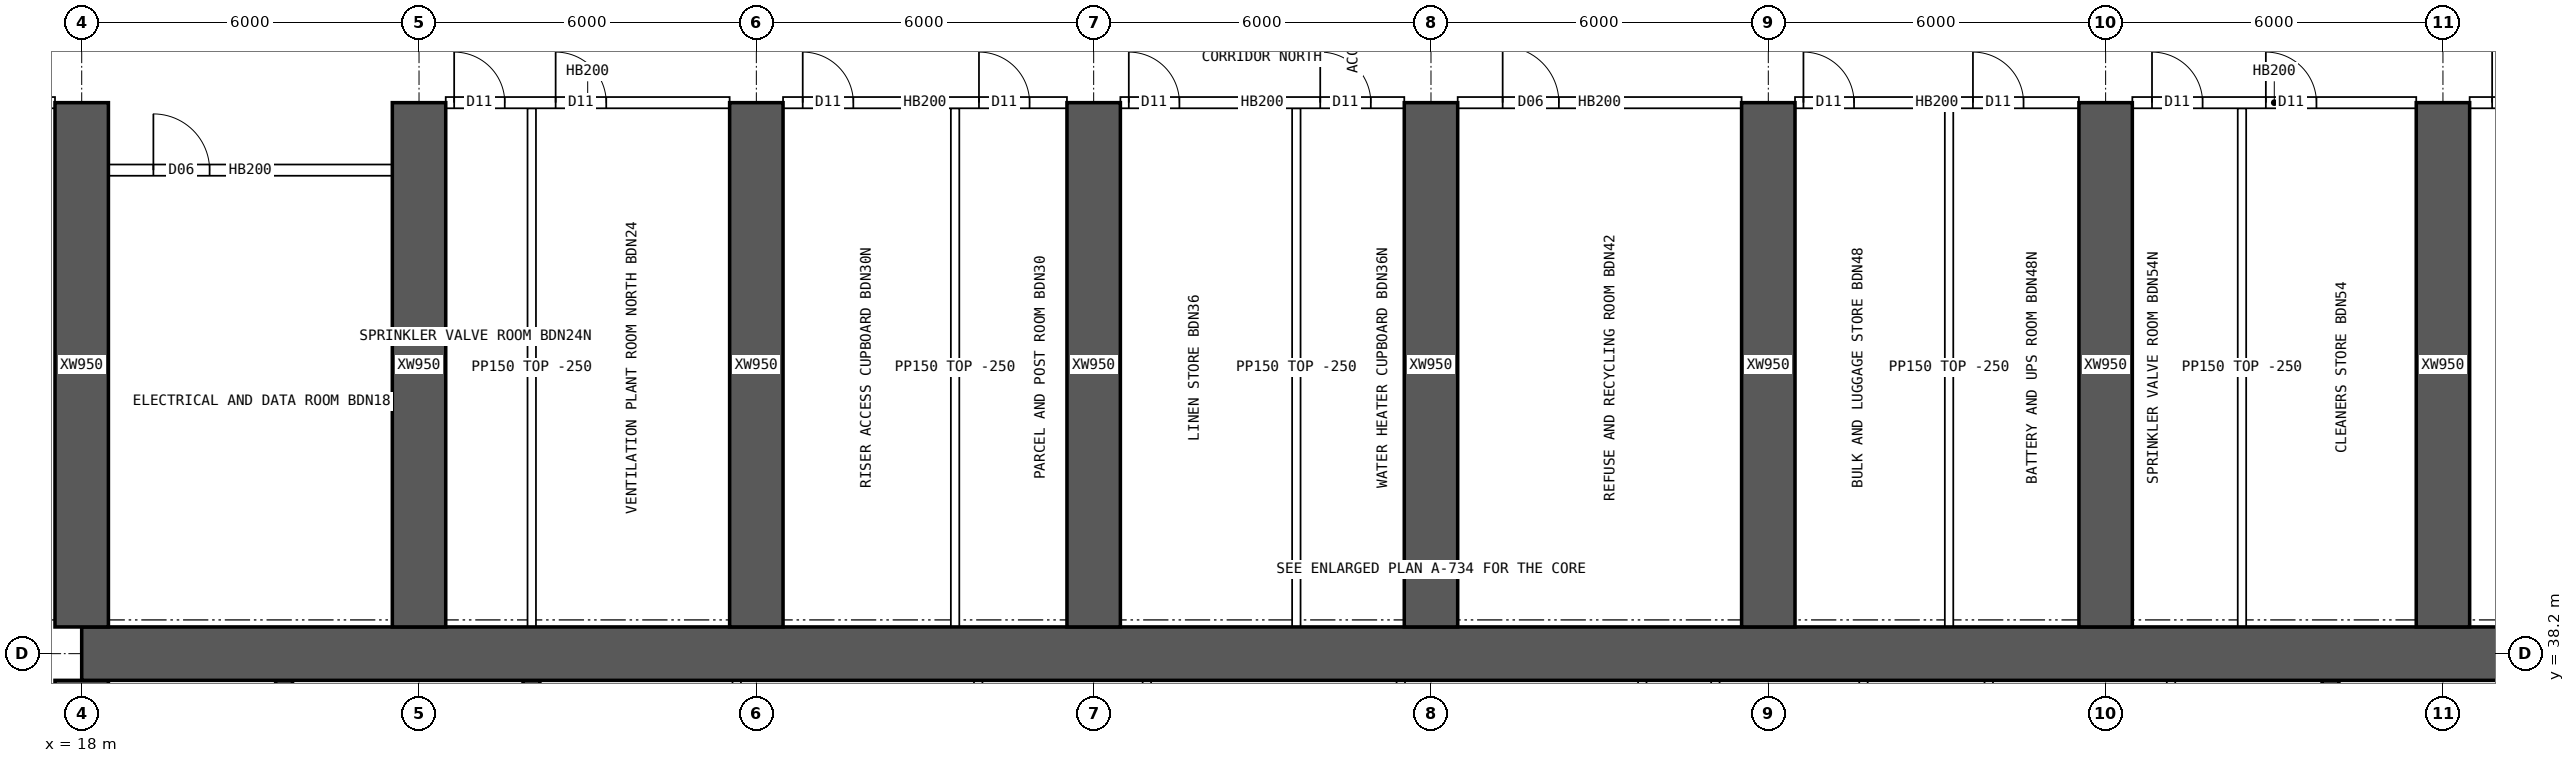
"""IFC4 building model, lengths in metres.
Left out: names, types, materials, properties, quantities, classifications, styles, units other than length and angle.
Written with IfcOpenShell. Run it as: python <this file> out.ifc"""

import sys

from ifc_helpers import new_model, si_unit, direction, frame, frame_2d, origin, place, context, subcontext, project, spatial, rectangle, extrude, element, fill, save


model = new_model("IFC4")
c1 = context("Model", 3, precision=1e-05, world=origin(), true_north=direction((0.0, 1.0)))
c2 = subcontext(c1, "Body", "Model", "MODEL_VIEW")
j1 = project(units=[si_unit("LENGTHUNIT", "METRE"), si_unit("PLANEANGLEUNIT", "RADIAN")], contexts=[c1])
p1 = place(None, origin())
s1 = spatial("IfcSite", under=j1, at=p1, CompositionType="ELEMENT")
p2 = place(p1, origin())
s2 = spatial("IfcBuilding", under=s1, at=p2, CompositionType="ELEMENT")
p3 = place(p2, frame((0.0, 0.0, 125.65)))
s3 = spatial("IfcBuildingStorey", under=s2, at=p3, CompositionType="ELEMENT", Elevation=125.65)
p4 = place(p3, frame((18.0, 38.2, 0.0), z_axis=(0.0, 0.0, 1.0), x_axis=(1.0, 0.0, 0.0)))
e1 = element("IfcWall", 1, at=p4, inside=s3, PredefinedType="SHEAR", context=c2, shape_type="SweptSolid", body=[
    extrude(rectangle(XDim=48.0, YDim=0.95, at=frame_2d((24.0, 0.0))), origin(), (0.0, 0.0, 1.0), 3.75),
])
p5 = place(p3, frame((18.0, 26.275, 0.0), z_axis=(0.0, 0.0, 1.0), x_axis=(0.0, 1.0, 0.0)))
e2 = element("IfcWall", 2, at=p5, inside=s3, PredefinedType="SHEAR", context=c2, shape_type="SweptSolid", body=[
    extrude(rectangle(XDim=11.45, YDim=0.95, at=frame_2d((5.725, 0.0))), origin(), (0.0, 0.0, 1.0), 3.75),
])
p6 = place(p5, frame((5.025, 0.0, 0.0)))
e3 = element("IfcOpeningElement", 3, at=p6, cuts=e2, PredefinedType="OPENING", context=c2, shape_type="SweptSolid", body=[
    extrude(rectangle(XDim=1.2, YDim=2.1, at=frame_2d((0.6, 1.05))), frame((0.0, 0.485, 0.0), z_axis=(0.0, -1.0, 0.0), x_axis=(1.0, 0.0, 0.0)), (0.0, 0.0, 1.0), 0.97),
])
for number, where, z_axis, x_axis in (
    (4, (21.6, 34.75, 0.0), (0.0, 0.0, 1.0), (0.0, 1.0, 0.0)),
    (5, (26.0, 34.75, 0.0), (0.0, 0.0, 1.0), (0.0, 1.0, 0.0)),
    (6, (58.0, 34.75, 0.0), (0.0, 0.0, 1.0), (0.0, 1.0, 0.0)),
):
    element("IfcWall", number, at=place(p3, frame(where, z_axis=z_axis, x_axis=x_axis)), inside=s3, PredefinedType="SHEAR", context=c2, shape_type="SweptSolid", body=[
        extrude(rectangle(XDim=2.975, YDim=0.3, at=frame_2d((1.488, 0.0))), origin(), (0.0, 0.0, 1.0), 3.75),
    ])
for number, where, z_axis, x_axis in (
    (7, (18.0, 38.675, 0.0), (0.0, 0.0, 1.0), (0.0, 1.0, 0.0)),
    (8, (24.0, 38.675, 0.0), (0.0, 0.0, 1.0), (0.0, 1.0, 0.0)),
    (9, (30.0, 38.675, 0.0), (0.0, 0.0, 1.0), (0.0, 1.0, 0.0)),
    (10, (36.0, 38.675, 0.0), (0.0, 0.0, 1.0), (0.0, 1.0, 0.0)),
    (11, (42.0, 38.675, 0.0), (0.0, 0.0, 1.0), (0.0, 1.0, 0.0)),
    (12, (48.0, 38.675, 0.0), (0.0, 0.0, 1.0), (0.0, 1.0, 0.0)),
    (13, (54.0, 38.675, 0.0), (0.0, 0.0, 1.0), (0.0, 1.0, 0.0)),
    (14, (60.0, 38.675, 0.0), (0.0, 0.0, 1.0), (0.0, 1.0, 0.0)),
):
    element("IfcWall", number, at=place(p3, frame(where, z_axis=z_axis, x_axis=x_axis)), inside=s3, PredefinedType="SHEAR", context=c2, shape_type="SweptSolid", body=[
        extrude(rectangle(XDim=9.325, YDim=0.95, at=frame_2d((4.663, 0.0))), origin(), (0.0, 0.0, 1.0), 3.75),
    ])
for number, where, z_axis, x_axis in (
    (15, (29.651, 34.75, 0.0), (0.0, 0.0, 1.0), (0.0, 1.0, 0.0)),
    (16, (33.946, 34.75, 0.0), (0.0, 0.0, 1.0), (0.0, 1.0, 0.0)),
    (17, (36.946, 34.75, 0.0), (0.0, 0.0, 1.0), (0.0, 1.0, 0.0)),
    (18, (41.463, 34.75, 0.0), (0.0, 0.0, 1.0), (0.0, 1.0, 0.0)),
    (19, (45.758, 34.75, 0.0), (0.0, 0.0, 1.0), (0.0, 1.0, 0.0)),
    (20, (47.058, 34.75, 0.0), (0.0, 0.0, 1.0), (0.0, 1.0, 0.0)),
    (21, (49.692, 34.75, 0.0), (0.0, 0.0, 1.0), (0.0, 1.0, 0.0)),
    (22, (51.921, 34.75, 0.0), (0.0, 0.0, 1.0), (0.0, 1.0, 0.0)),
    (23, (55.163, 34.75, 0.0), (0.0, 0.0, 1.0), (0.0, 1.0, 0.0)),
):
    element("IfcWall", number, at=place(p3, frame(where, z_axis=z_axis, x_axis=x_axis)), inside=s3, PredefinedType="SOLIDWALL", context=c2, shape_type="SweptSolid", body=[
        extrude(rectangle(XDim=2.975, YDim=0.15, at=frame_2d((1.488, 0.0))), origin(), (0.0, 0.0, 1.0), 3.5),
    ])
p7 = place(p3, frame((12.475, 48.0, 0.0), z_axis=(0.0, 0.0, 1.0), x_axis=(1.0, 0.0, 0.0)))
e24 = element("IfcWall", 24, at=p7, inside=s3, PredefinedType="SOLIDWALL", context=c2, shape_type="SweptSolid", body=[
    extrude(rectangle(XDim=5.05, YDim=0.2, at=frame_2d((2.525, 0.0))), origin(), (0.0, 0.0, 1.0), 3.5),
])
p8 = place(p7, frame((3.325, 0.0, 0.0)))
e25 = element("IfcOpeningElement", 25, at=p8, cuts=e24, PredefinedType="OPENING", context=c2, shape_type="SweptSolid", body=[
    extrude(rectangle(XDim=1.6, YDim=2.1, at=frame_2d((0.8, 1.05))), frame((0.0, 0.11, 0.0), z_axis=(0.0, -1.0, 0.0), x_axis=(1.0, 0.0, 0.0)), (0.0, 0.0, 1.0), 0.22),
])
p9 = place(p3, frame((24.475, 48.0, 0.0), z_axis=(0.0, 0.0, 1.0), x_axis=(1.0, 0.0, 0.0)))
e26 = element("IfcWall", 26, at=p9, inside=s3, PredefinedType="SOLIDWALL", context=c2, shape_type="SweptSolid", body=[
    extrude(rectangle(XDim=5.05, YDim=0.2, at=frame_2d((2.525, 0.0))), origin(), (0.0, 0.0, 1.0), 3.5),
])
p10 = place(p9, frame((0.15, 0.0, 0.0)))
e27 = element("IfcOpeningElement", 27, at=p10, cuts=e26, PredefinedType="OPENING", context=c2, shape_type="SweptSolid", body=[
    extrude(rectangle(XDim=0.9, YDim=2.1, at=frame_2d((0.45, 1.05))), frame((0.0, 0.11, 0.0), z_axis=(0.0, -1.0, 0.0), x_axis=(1.0, 0.0, 0.0)), (0.0, 0.0, 1.0), 0.22),
])
p11 = place(p9, frame((1.955, 0.0, 0.0)))
e28 = element("IfcOpeningElement", 28, at=p11, cuts=e26, PredefinedType="OPENING", context=c2, shape_type="SweptSolid", body=[
    extrude(rectangle(XDim=0.9, YDim=2.1, at=frame_2d((0.45, 1.05))), frame((0.0, 0.11, 0.0), z_axis=(0.0, -1.0, 0.0), x_axis=(1.0, 0.0, 0.0)), (0.0, 0.0, 1.0), 0.22),
])
p12 = place(p3, frame((30.475, 48.0, 0.0), z_axis=(0.0, 0.0, 1.0), x_axis=(1.0, 0.0, 0.0)))
e29 = element("IfcWall", 29, at=p12, inside=s3, PredefinedType="SOLIDWALL", context=c2, shape_type="SweptSolid", body=[
    extrude(rectangle(XDim=5.05, YDim=0.2, at=frame_2d((2.525, 0.0))), origin(), (0.0, 0.0, 1.0), 3.5),
])
p13 = place(p12, frame((0.35, 0.0, 0.0)))
e30 = element("IfcOpeningElement", 30, at=p13, cuts=e29, PredefinedType="OPENING", context=c2, shape_type="SweptSolid", body=[
    extrude(rectangle(XDim=0.9, YDim=2.1, at=frame_2d((0.45, 1.05))), frame((0.0, 0.11, 0.0), z_axis=(0.0, -1.0, 0.0), x_axis=(1.0, 0.0, 0.0)), (0.0, 0.0, 1.0), 0.22),
])
p14 = place(p12, frame((3.485, 0.0, 0.0)))
e31 = element("IfcOpeningElement", 31, at=p14, cuts=e29, PredefinedType="OPENING", context=c2, shape_type="SweptSolid", body=[
    extrude(rectangle(XDim=0.9, YDim=2.1, at=frame_2d((0.45, 1.05))), frame((0.0, 0.11, 0.0), z_axis=(0.0, -1.0, 0.0), x_axis=(1.0, 0.0, 0.0)), (0.0, 0.0, 1.0), 0.22),
])
p15 = place(p3, frame((36.475, 48.0, 0.0), z_axis=(0.0, 0.0, 1.0), x_axis=(1.0, 0.0, 0.0)))
e32 = element("IfcWall", 32, at=p15, inside=s3, PredefinedType="SOLIDWALL", context=c2, shape_type="SweptSolid", body=[
    extrude(rectangle(XDim=5.05, YDim=0.2, at=frame_2d((2.525, 0.0))), origin(), (0.0, 0.0, 1.0), 3.5),
])
p16 = place(p15, frame((0.15, 0.0, 0.0)))
e33 = element("IfcOpeningElement", 33, at=p16, cuts=e32, PredefinedType="OPENING", context=c2, shape_type="SweptSolid", body=[
    extrude(rectangle(XDim=0.9, YDim=2.1, at=frame_2d((0.45, 1.05))), frame((0.0, 0.11, 0.0), z_axis=(0.0, -1.0, 0.0), x_axis=(1.0, 0.0, 0.0)), (0.0, 0.0, 1.0), 0.22),
])
p17 = place(p15, frame((3.555, 0.0, 0.0)))
e34 = element("IfcOpeningElement", 34, at=p17, cuts=e32, PredefinedType="OPENING", context=c2, shape_type="SweptSolid", body=[
    extrude(rectangle(XDim=0.9, YDim=2.1, at=frame_2d((0.45, 1.05))), frame((0.0, 0.11, 0.0), z_axis=(0.0, -1.0, 0.0), x_axis=(1.0, 0.0, 0.0)), (0.0, 0.0, 1.0), 0.22),
])
p18 = place(p3, frame((42.475, 48.0, 0.0), z_axis=(0.0, 0.0, 1.0), x_axis=(1.0, 0.0, 0.0)))
e35 = element("IfcWall", 35, at=p18, inside=s3, PredefinedType="SOLIDWALL", context=c2, shape_type="SweptSolid", body=[
    extrude(rectangle(XDim=5.05, YDim=0.2, at=frame_2d((2.525, 0.0))), origin(), (0.0, 0.0, 1.0), 3.5),
])
p19 = place(p18, frame((0.8, 0.0, 0.0)))
e36 = element("IfcOpeningElement", 36, at=p19, cuts=e35, PredefinedType="OPENING", context=c2, shape_type="SweptSolid", body=[
    extrude(rectangle(XDim=1.0, YDim=2.1, at=frame_2d((0.5, 1.05))), frame((0.0, 0.11, 0.0), z_axis=(0.0, -1.0, 0.0), x_axis=(1.0, 0.0, 0.0)), (0.0, 0.0, 1.0), 0.22),
])
p20 = place(p3, frame((48.475, 48.0, 0.0), z_axis=(0.0, 0.0, 1.0), x_axis=(1.0, 0.0, 0.0)))
e37 = element("IfcWall", 37, at=p20, inside=s3, PredefinedType="SOLIDWALL", context=c2, shape_type="SweptSolid", body=[
    extrude(rectangle(XDim=5.05, YDim=0.2, at=frame_2d((2.525, 0.0))), origin(), (0.0, 0.0, 1.0), 3.5),
])
p21 = place(p20, frame((0.15, 0.0, 0.0)))
e38 = element("IfcOpeningElement", 38, at=p21, cuts=e37, PredefinedType="OPENING", context=c2, shape_type="SweptSolid", body=[
    extrude(rectangle(XDim=0.9, YDim=2.1, at=frame_2d((0.45, 1.05))), frame((0.0, 0.11, 0.0), z_axis=(0.0, -1.0, 0.0), x_axis=(1.0, 0.0, 0.0)), (0.0, 0.0, 1.0), 0.22),
])
p22 = place(p20, frame((3.165, 0.0, 0.0)))
e39 = element("IfcOpeningElement", 39, at=p22, cuts=e37, PredefinedType="OPENING", context=c2, shape_type="SweptSolid", body=[
    extrude(rectangle(XDim=0.9, YDim=2.1, at=frame_2d((0.45, 1.05))), frame((0.0, 0.11, 0.0), z_axis=(0.0, -1.0, 0.0), x_axis=(1.0, 0.0, 0.0)), (0.0, 0.0, 1.0), 0.22),
])
p23 = place(p3, frame((54.475, 48.0, 0.0), z_axis=(0.0, 0.0, 1.0), x_axis=(1.0, 0.0, 0.0)))
e40 = element("IfcWall", 40, at=p23, inside=s3, PredefinedType="SOLIDWALL", context=c2, shape_type="SweptSolid", body=[
    extrude(rectangle(XDim=5.05, YDim=0.2, at=frame_2d((2.525, 0.0))), origin(), (0.0, 0.0, 1.0), 3.5),
])
p24 = place(p23, frame((0.35, 0.0, 0.0)))
e41 = element("IfcOpeningElement", 41, at=p24, cuts=e40, PredefinedType="OPENING", context=c2, shape_type="SweptSolid", body=[
    extrude(rectangle(XDim=0.9, YDim=2.1, at=frame_2d((0.45, 1.05))), frame((0.0, 0.11, 0.0), z_axis=(0.0, -1.0, 0.0), x_axis=(1.0, 0.0, 0.0)), (0.0, 0.0, 1.0), 0.22),
])
p25 = place(p23, frame((2.375, 0.0, 0.0)))
e42 = element("IfcOpeningElement", 42, at=p25, cuts=e40, PredefinedType="OPENING", context=c2, shape_type="SweptSolid", body=[
    extrude(rectangle(XDim=0.9, YDim=2.1, at=frame_2d((0.45, 1.05))), frame((0.0, 0.11, 0.0), z_axis=(0.0, -1.0, 0.0), x_axis=(1.0, 0.0, 0.0)), (0.0, 0.0, 1.0), 0.22),
])
p26 = place(p3, frame((60.475, 48.0, 0.0), z_axis=(0.0, 0.0, 1.0), x_axis=(1.0, 0.0, 0.0)))
e43 = element("IfcWall", 43, at=p26, inside=s3, PredefinedType="SOLIDWALL", context=c2, shape_type="SweptSolid", body=[
    extrude(rectangle(XDim=5.05, YDim=0.2, at=frame_2d((2.525, 0.0))), origin(), (0.0, 0.0, 1.0), 3.5),
])
p27 = place(p26, frame((0.4, 0.0, 0.0)))
e44 = element("IfcOpeningElement", 44, at=p27, cuts=e43, PredefinedType="OPENING", context=c2, shape_type="SweptSolid", body=[
    extrude(rectangle(XDim=1.0, YDim=2.1, at=frame_2d((0.5, 1.05))), frame((0.0, 0.11, 0.0), z_axis=(0.0, -1.0, 0.0), x_axis=(1.0, 0.0, 0.0)), (0.0, 0.0, 1.0), 0.22),
])
p28 = place(p3, frame((18.475, 46.8, 0.0), z_axis=(0.0, 0.0, 1.0), x_axis=(1.0, 0.0, 0.0)))
e45 = element("IfcWall", 45, at=p28, inside=s3, PredefinedType="SOLIDWALL", context=c2, shape_type="SweptSolid", body=[
    extrude(rectangle(XDim=5.05, YDim=0.2, at=frame_2d((2.525, 0.0))), origin(), (0.0, 0.0, 1.0), 3.5),
])
p29 = place(p28, frame((0.8, 0.0, 0.0)))
e46 = element("IfcOpeningElement", 46, at=p29, cuts=e45, PredefinedType="OPENING", context=c2, shape_type="SweptSolid", body=[
    extrude(rectangle(XDim=1.0, YDim=2.1, at=frame_2d((0.5, 1.05))), frame((0.0, 0.11, 0.0), z_axis=(0.0, -1.0, 0.0), x_axis=(1.0, 0.0, 0.0)), (0.0, 0.0, 1.0), 0.22),
])
for number, where, z_axis, x_axis in (
    (47, (26.005, 38.675, 0.0), (0.0, 0.0, 1.0), (0.0, 1.0, 0.0)),
    (48, (33.535, 38.675, 0.0), (0.0, 0.0, 1.0), (0.0, 1.0, 0.0)),
    (49, (39.605, 38.675, 0.0), (0.0, 0.0, 1.0), (0.0, 1.0, 0.0)),
    (50, (51.215, 38.675, 0.0), (0.0, 0.0, 1.0), (0.0, 1.0, 0.0)),
    (51, (56.425, 38.675, 0.0), (0.0, 0.0, 1.0), (0.0, 1.0, 0.0)),
):
    element("IfcWall", number, at=place(p3, frame(where, z_axis=z_axis, x_axis=x_axis)), inside=s3, PredefinedType="PARTITIONING", context=c2, shape_type="SweptSolid", body=[
        extrude(rectangle(XDim=9.225, YDim=0.15, at=frame_2d((4.612, 0.0))), origin(), (0.0, 0.0, 1.0), 3.5),
    ])
p30 = place(p29, origin())
e52 = element("IfcDoor", 52, at=p30, inside=s3, OperationType="SINGLE_SWING_LEFT", PredefinedType="DOOR", context=c2, shape_type="SweptSolid", body=[
    extrude(rectangle(XDim=1.0, YDim=2.1, at=frame_2d((0.5, 1.05))), frame((0.0, 0.025, 0.0), z_axis=(0.0, -1.0, 0.0), x_axis=(1.0, 0.0, 0.0)), (0.0, 0.0, 1.0), 0.05),
])
fill(e46, e52)
p31 = place(p10, origin())
e53 = element("IfcDoor", 53, at=p31, inside=s3, OperationType="SINGLE_SWING_LEFT", PredefinedType="DOOR", context=c2, shape_type="SweptSolid", body=[
    extrude(rectangle(XDim=0.9, YDim=2.1, at=frame_2d((0.45, 1.05))), frame((0.0, 0.025, 0.0), z_axis=(0.0, -1.0, 0.0), x_axis=(1.0, 0.0, 0.0)), (0.0, 0.0, 1.0), 0.05),
])
fill(e27, e53)
p32 = place(p11, origin())
e54 = element("IfcDoor", 54, at=p32, inside=s3, OperationType="SINGLE_SWING_LEFT", PredefinedType="DOOR", context=c2, shape_type="SweptSolid", body=[
    extrude(rectangle(XDim=0.9, YDim=2.1, at=frame_2d((0.45, 1.05))), frame((0.0, 0.025, 0.0), z_axis=(0.0, -1.0, 0.0), x_axis=(1.0, 0.0, 0.0)), (0.0, 0.0, 1.0), 0.05),
])
fill(e28, e54)
p33 = place(p13, origin())
e55 = element("IfcDoor", 55, at=p33, inside=s3, OperationType="SINGLE_SWING_LEFT", PredefinedType="DOOR", context=c2, shape_type="SweptSolid", body=[
    extrude(rectangle(XDim=0.9, YDim=2.1, at=frame_2d((0.45, 1.05))), frame((0.0, 0.025, 0.0), z_axis=(0.0, -1.0, 0.0), x_axis=(1.0, 0.0, 0.0)), (0.0, 0.0, 1.0), 0.05),
])
fill(e30, e55)
p34 = place(p14, origin())
e56 = element("IfcDoor", 56, at=p34, inside=s3, OperationType="SINGLE_SWING_LEFT", PredefinedType="DOOR", context=c2, shape_type="SweptSolid", body=[
    extrude(rectangle(XDim=0.9, YDim=2.1, at=frame_2d((0.45, 1.05))), frame((0.0, 0.025, 0.0), z_axis=(0.0, -1.0, 0.0), x_axis=(1.0, 0.0, 0.0)), (0.0, 0.0, 1.0), 0.05),
])
fill(e31, e56)
p35 = place(p16, origin())
e57 = element("IfcDoor", 57, at=p35, inside=s3, OperationType="SINGLE_SWING_LEFT", PredefinedType="DOOR", context=c2, shape_type="SweptSolid", body=[
    extrude(rectangle(XDim=0.9, YDim=2.1, at=frame_2d((0.45, 1.05))), frame((0.0, 0.025, 0.0), z_axis=(0.0, -1.0, 0.0), x_axis=(1.0, 0.0, 0.0)), (0.0, 0.0, 1.0), 0.05),
])
fill(e33, e57)
p36 = place(p17, origin())
e58 = element("IfcDoor", 58, at=p36, inside=s3, OperationType="SINGLE_SWING_LEFT", PredefinedType="DOOR", context=c2, shape_type="SweptSolid", body=[
    extrude(rectangle(XDim=0.9, YDim=2.1, at=frame_2d((0.45, 1.05))), frame((0.0, 0.025, 0.0), z_axis=(0.0, -1.0, 0.0), x_axis=(1.0, 0.0, 0.0)), (0.0, 0.0, 1.0), 0.05),
])
fill(e34, e58)
p37 = place(p19, origin())
e59 = element("IfcDoor", 59, at=p37, inside=s3, OperationType="SINGLE_SWING_LEFT", PredefinedType="DOOR", context=c2, shape_type="SweptSolid", body=[
    extrude(rectangle(XDim=1.0, YDim=2.1, at=frame_2d((0.5, 1.05))), frame((0.0, 0.025, 0.0), z_axis=(0.0, -1.0, 0.0), x_axis=(1.0, 0.0, 0.0)), (0.0, 0.0, 1.0), 0.05),
])
fill(e36, e59)
p38 = place(p21, origin())
e60 = element("IfcDoor", 60, at=p38, inside=s3, OperationType="SINGLE_SWING_LEFT", PredefinedType="DOOR", context=c2, shape_type="SweptSolid", body=[
    extrude(rectangle(XDim=0.9, YDim=2.1, at=frame_2d((0.45, 1.05))), frame((0.0, 0.025, 0.0), z_axis=(0.0, -1.0, 0.0), x_axis=(1.0, 0.0, 0.0)), (0.0, 0.0, 1.0), 0.05),
])
fill(e38, e60)
p39 = place(p22, origin())
e61 = element("IfcDoor", 61, at=p39, inside=s3, OperationType="SINGLE_SWING_LEFT", PredefinedType="DOOR", context=c2, shape_type="SweptSolid", body=[
    extrude(rectangle(XDim=0.9, YDim=2.1, at=frame_2d((0.45, 1.05))), frame((0.0, 0.025, 0.0), z_axis=(0.0, -1.0, 0.0), x_axis=(1.0, 0.0, 0.0)), (0.0, 0.0, 1.0), 0.05),
])
fill(e39, e61)
p40 = place(p24, origin())
e62 = element("IfcDoor", 62, at=p40, inside=s3, OperationType="SINGLE_SWING_LEFT", PredefinedType="DOOR", context=c2, shape_type="SweptSolid", body=[
    extrude(rectangle(XDim=0.9, YDim=2.1, at=frame_2d((0.45, 1.05))), frame((0.0, 0.025, 0.0), z_axis=(0.0, -1.0, 0.0), x_axis=(1.0, 0.0, 0.0)), (0.0, 0.0, 1.0), 0.05),
])
fill(e41, e62)
p41 = place(p25, origin())
e63 = element("IfcDoor", 63, at=p41, inside=s3, OperationType="SINGLE_SWING_LEFT", PredefinedType="DOOR", context=c2, shape_type="SweptSolid", body=[
    extrude(rectangle(XDim=0.9, YDim=2.1, at=frame_2d((0.45, 1.05))), frame((0.0, 0.025, 0.0), z_axis=(0.0, -1.0, 0.0), x_axis=(1.0, 0.0, 0.0)), (0.0, 0.0, 1.0), 0.05),
])
fill(e42, e63)
p42 = place(p27, origin())
e64 = element("IfcDoor", 64, at=p42, inside=s3, OperationType="SINGLE_SWING_LEFT", PredefinedType="DOOR", context=c2, shape_type="SweptSolid", body=[
    extrude(rectangle(XDim=1.0, YDim=2.1, at=frame_2d((0.5, 1.05))), frame((0.0, 0.025, 0.0), z_axis=(0.0, -1.0, 0.0), x_axis=(1.0, 0.0, 0.0)), (0.0, 0.0, 1.0), 0.05),
])
fill(e44, e64)
save(model, sys.argv[1])
